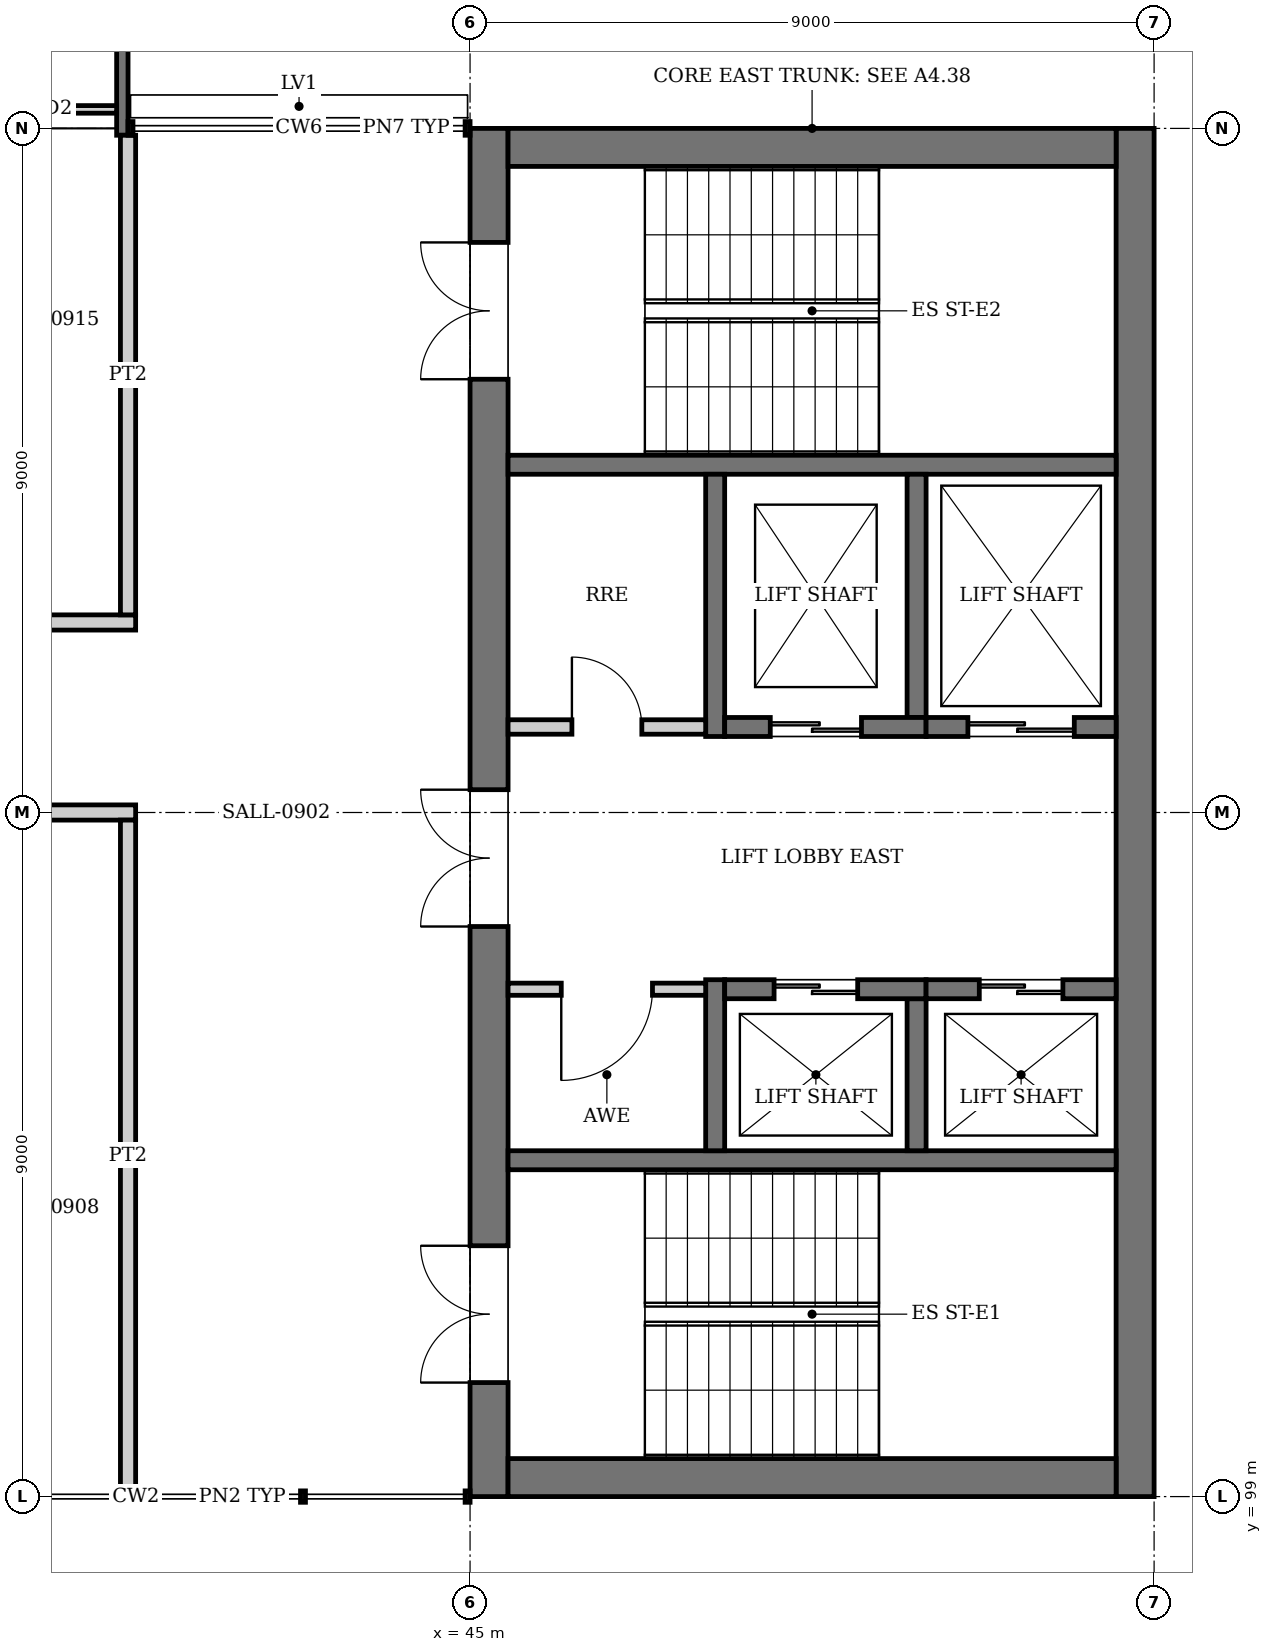
"""IFC4 building model, lengths in metres.
Left out: names, types, materials, properties, quantities, classifications, styles, units other than length and angle.
Written with IfcOpenShell. Run it as: python <this file> out.ifc"""

import sys

from ifc_helpers import new_model, si_unit, direction, frame, frame_2d, origin, place, context, subcontext, project, spatial, rectangle, extrude, element, fill, save


model = new_model("IFC4")
c1 = context("Model", 3, precision=1e-05, world=origin(), true_north=direction((0.0, 1.0)))
c2 = subcontext(c1, "Body", "Model", "MODEL_VIEW")
j1 = project(units=[si_unit("LENGTHUNIT", "METRE"), si_unit("PLANEANGLEUNIT", "RADIAN")], contexts=[c1])
p1 = place(None, origin())
s1 = spatial("IfcSite", under=j1, at=p1, CompositionType="ELEMENT")
p2 = place(p1, origin())
s2 = spatial("IfcBuilding", under=s1, at=p2, CompositionType="ELEMENT")
p3 = place(p2, frame((0.0, 0.0, 39.2)))
s3 = spatial("IfcBuildingStorey", under=s2, at=p3, CompositionType="ELEMENT", Elevation=39.2)
p4 = place(p3, frame((45.25, 99.0, 0.0), z_axis=(0.0, 0.0, 1.0), x_axis=(0.0, 1.0, 0.0)))
e1 = element("IfcWall", 1, at=p4, inside=s3, PredefinedType="SHEAR", context=c2, shape_type="SweptSolid", body=[
    extrude(rectangle(XDim=18.0, YDim=0.5, at=frame_2d((9.0, 0.0))), origin(), (0.0, 0.0, 1.0), 4.0),
])
p5 = place(p4, frame((1.5, 0.0, 0.0)))
e2 = element("IfcOpeningElement", 2, at=p5, cuts=e1, PredefinedType="OPENING", context=c2, shape_type="SweptSolid", body=[
    extrude(rectangle(XDim=1.8, YDim=2.1, at=frame_2d((0.9, 1.05))), frame((0.0, 0.26, 0.0), z_axis=(0.0, -1.0, 0.0), x_axis=(1.0, 0.0, 0.0)), (0.0, 0.0, 1.0), 0.52),
])
p6 = place(p4, frame((14.7, 0.0, 0.0)))
e3 = element("IfcOpeningElement", 3, at=p6, cuts=e1, PredefinedType="OPENING", context=c2, shape_type="SweptSolid", body=[
    extrude(rectangle(XDim=1.8, YDim=2.1, at=frame_2d((0.9, 1.05))), frame((0.0, 0.26, 0.0), z_axis=(0.0, -1.0, 0.0), x_axis=(1.0, 0.0, 0.0)), (0.0, 0.0, 1.0), 0.52),
])
p7 = place(p4, frame((7.5, 0.0, 0.0)))
e4 = element("IfcOpeningElement", 4, at=p7, cuts=e1, PredefinedType="OPENING", context=c2, shape_type="SweptSolid", body=[
    extrude(rectangle(XDim=1.8, YDim=2.1, at=frame_2d((0.9, 1.05))), frame((0.0, 0.26, 0.0), z_axis=(0.0, -1.0, 0.0), x_axis=(1.0, 0.0, 0.0)), (0.0, 0.0, 1.0), 0.52),
])
p8 = place(p3, frame((53.75, 99.0, 0.0), z_axis=(0.0, 0.0, 1.0), x_axis=(0.0, 1.0, 0.0)))
e5 = element("IfcWall", 5, at=p8, inside=s3, PredefinedType="SHEAR", context=c2, shape_type="SweptSolid", body=[
    extrude(rectangle(XDim=18.0, YDim=0.5, at=frame_2d((9.0, 0.0))), origin(), (0.0, 0.0, 1.0), 4.0),
])
for number, where, z_axis, x_axis in (
    (6, (45.5, 99.25, 0.0), (0.0, 0.0, 1.0), (1.0, 0.0, 0.0)),
    (7, (45.5, 116.75, 0.0), (0.0, 0.0, 1.0), (1.0, 0.0, 0.0)),
):
    element("IfcWall", number, at=place(p3, frame(where, z_axis=z_axis, x_axis=x_axis)), inside=s3, PredefinedType="SHEAR", context=c2, shape_type="SweptSolid", body=[
        extrude(rectangle(XDim=8.0, YDim=0.5, at=frame_2d((4.0, 0.0))), origin(), (0.0, 0.0, 1.0), 4.0),
    ])
p9 = place(p3, frame((40.425, 120.45, -0.15), z_axis=(0.0, 0.0, 1.0), x_axis=(0.0, -1.0, 0.0)))
e8 = element("IfcWall", 8, at=p9, inside=s3, PredefinedType="SOLIDWALL", context=c2, shape_type="SweptSolid", body=[
    extrude(rectangle(XDim=3.54, YDim=0.15, at=frame_2d((1.77, 0.0))), origin(), (0.0, 0.0, 1.0), 2.75),
])
p10 = place(p3, frame((36.15, 117.25, 0.0), z_axis=(0.0, 0.0, 1.0), x_axis=(1.0, 0.0, 0.0)))
e9 = element("IfcWall", 9, at=p10, inside=s3, PredefinedType="PARTITIONING", context=c2, shape_type="SweptSolid", body=[
    extrude(rectangle(XDim=4.2, YDim=0.1, at=frame_2d((2.1, 0.0))), origin(), (0.0, 0.0, 1.0), 2.6),
])
p11 = place(p10, frame((1.6, 0.0, 0.0)))
e10 = element("IfcOpeningElement", 10, at=p11, cuts=e9, PredefinedType="OPENING", context=c2, shape_type="SweptSolid", body=[
    extrude(rectangle(XDim=0.9, YDim=2.1, at=frame_2d((0.45, 1.05))), frame((0.0, 0.06, 0.0), z_axis=(0.0, -1.0, 0.0), x_axis=(1.0, 0.0, 0.0)), (0.0, 0.0, 1.0), 0.12),
])
for number, where, z_axis, x_axis in (
    (11, (45.5, 103.425, 0.0), (0.0, 0.0, 1.0), (1.0, 0.0, 0.0)),
    (12, (45.5, 112.575, 0.0), (0.0, 0.0, 1.0), (1.0, 0.0, 0.0)),
):
    element("IfcWall", number, at=place(p3, frame(where, z_axis=z_axis, x_axis=x_axis)), inside=s3, PredefinedType="SOLIDWALL", context=c2, shape_type="SweptSolid", body=[
        extrude(rectangle(XDim=8.0, YDim=0.25, at=frame_2d((4.0, 0.0))), origin(), (0.0, 0.0, 1.0), 3.75),
    ])
p12 = place(p3, frame((48.225, 103.55, 0.0), z_axis=(0.0, 0.0, 1.0), x_axis=(0.0, 1.0, 0.0)))
e13 = element("IfcWall", 13, at=p12, inside=s3, PredefinedType="SOLIDWALL", context=c2, shape_type="SweptSolid", body=[
    extrude(rectangle(XDim=2.25, YDim=0.25, at=frame_2d((1.125, 0.0))), origin(), (0.0, 0.0, 1.0), 4.0),
])
p13 = place(p3, frame((50.875, 103.55, 0.0), z_axis=(0.0, 0.0, 1.0), x_axis=(0.0, 1.0, 0.0)))
e14 = element("IfcWall", 14, at=p13, inside=s3, PredefinedType="SOLIDWALL", context=c2, shape_type="SweptSolid", body=[
    extrude(rectangle(XDim=2.0, YDim=0.25, at=frame_2d((1.0, 0.0))), origin(), (0.0, 0.0, 1.0), 4.0),
])
p14 = place(p3, frame((48.35, 105.675, 0.0), z_axis=(0.0, 0.0, 1.0), x_axis=(1.0, 0.0, 0.0)))
e15 = element("IfcWall", 15, at=p14, inside=s3, PredefinedType="SOLIDWALL", context=c2, shape_type="SweptSolid", body=[
    extrude(rectangle(XDim=2.65, YDim=0.25, at=frame_2d((1.325, 0.0))), origin(), (0.0, 0.0, 1.0), 4.0),
])
p15 = place(p14, frame((0.65, 0.0, 0.0)))
e16 = element("IfcOpeningElement", 16, at=p15, cuts=e15, PredefinedType="OPENING", context=c2, shape_type="SweptSolid", body=[
    extrude(rectangle(XDim=1.1, YDim=2.1, at=frame_2d((0.55, 1.05))), frame((0.0, 0.135, 0.0), z_axis=(0.0, -1.0, 0.0), x_axis=(1.0, 0.0, 0.0)), (0.0, 0.0, 1.0), 0.27),
])
p16 = place(p3, frame((51.0, 105.675, 0.0), z_axis=(0.0, 0.0, 1.0), x_axis=(1.0, 0.0, 0.0)))
e17 = element("IfcWall", 17, at=p16, inside=s3, PredefinedType="SOLIDWALL", context=c2, shape_type="SweptSolid", body=[
    extrude(rectangle(XDim=2.5, YDim=0.25, at=frame_2d((1.25, 0.0))), origin(), (0.0, 0.0, 1.0), 4.0),
])
p17 = place(p16, frame((0.7, 0.0, 0.0)))
e18 = element("IfcOpeningElement", 18, at=p17, cuts=e17, PredefinedType="OPENING", context=c2, shape_type="SweptSolid", body=[
    extrude(rectangle(XDim=1.1, YDim=2.1, at=frame_2d((0.55, 1.05))), frame((0.0, 0.135, 0.0), z_axis=(0.0, -1.0, 0.0), x_axis=(1.0, 0.0, 0.0)), (0.0, 0.0, 1.0), 0.27),
])
p18 = place(p3, frame((48.225, 109.0, 0.0), z_axis=(0.0, 0.0, 1.0), x_axis=(0.0, 1.0, 0.0)))
e19 = element("IfcWall", 19, at=p18, inside=s3, PredefinedType="SOLIDWALL", context=c2, shape_type="SweptSolid", body=[
    extrude(rectangle(XDim=3.45, YDim=0.25, at=frame_2d((1.725, 0.0))), origin(), (0.0, 0.0, 1.0), 4.0),
])
p19 = place(p3, frame((50.875, 109.25, 0.0), z_axis=(0.0, 0.0, 1.0), x_axis=(0.0, 1.0, 0.0)))
e20 = element("IfcWall", 20, at=p19, inside=s3, PredefinedType="SOLIDWALL", context=c2, shape_type="SweptSolid", body=[
    extrude(rectangle(XDim=3.2, YDim=0.25, at=frame_2d((1.6, 0.0))), origin(), (0.0, 0.0, 1.0), 4.0),
])
p20 = place(p3, frame((48.35, 109.125, 0.0), z_axis=(0.0, 0.0, 1.0), x_axis=(1.0, 0.0, 0.0)))
e21 = element("IfcWall", 21, at=p20, inside=s3, PredefinedType="SOLIDWALL", context=c2, shape_type="SweptSolid", body=[
    extrude(rectangle(XDim=2.65, YDim=0.25, at=frame_2d((1.325, 0.0))), origin(), (0.0, 0.0, 1.0), 4.0),
])
p21 = place(p20, frame((0.6, 0.0, 0.0)))
e22 = element("IfcOpeningElement", 22, at=p21, cuts=e21, PredefinedType="OPENING", context=c2, shape_type="SweptSolid", body=[
    extrude(rectangle(XDim=1.2, YDim=2.1, at=frame_2d((0.6, 1.05))), frame((0.0, 0.135, 0.0), z_axis=(0.0, -1.0, 0.0), x_axis=(1.0, 0.0, 0.0)), (0.0, 0.0, 1.0), 0.27),
])
p22 = place(p3, frame((51.0, 109.125, 0.0), z_axis=(0.0, 0.0, 1.0), x_axis=(1.0, 0.0, 0.0)))
e23 = element("IfcWall", 23, at=p22, inside=s3, PredefinedType="SOLIDWALL", context=c2, shape_type="SweptSolid", body=[
    extrude(rectangle(XDim=2.5, YDim=0.25, at=frame_2d((1.25, 0.0))), origin(), (0.0, 0.0, 1.0), 4.0),
])
p23 = place(p22, frame((0.55, 0.0, 0.0)))
e24 = element("IfcOpeningElement", 24, at=p23, cuts=e23, PredefinedType="OPENING", context=c2, shape_type="SweptSolid", body=[
    extrude(rectangle(XDim=1.4, YDim=2.4, at=frame_2d((0.7, 1.2))), frame((0.0, 0.135, 0.0), z_axis=(0.0, -1.0, 0.0), x_axis=(1.0, 0.0, 0.0)), (0.0, 0.0, 1.0), 0.27),
])
p24 = place(p3, frame((45.5, 105.675, 0.0), z_axis=(0.0, 0.0, 1.0), x_axis=(1.0, 0.0, 0.0)))
e25 = element("IfcWall", 25, at=p24, inside=s3, PredefinedType="PARTITIONING", context=c2, shape_type="SweptSolid", body=[
    extrude(rectangle(XDim=2.6, YDim=0.16, at=frame_2d((1.3, 0.0))), origin(), (0.0, 0.0, 1.0), 3.75),
])
p25 = place(p24, frame((0.7, 0.0, 0.0)))
e26 = element("IfcOpeningElement", 26, at=p25, cuts=e25, PredefinedType="OPENING", context=c2, shape_type="SweptSolid", body=[
    extrude(rectangle(XDim=1.2, YDim=2.1, at=frame_2d((0.6, 1.05))), frame((0.0, 0.09, 0.0), z_axis=(0.0, -1.0, 0.0), x_axis=(1.0, 0.0, 0.0)), (0.0, 0.0, 1.0), 0.18),
])
p26 = place(p3, frame((45.5, 109.125, 0.0), z_axis=(0.0, 0.0, 1.0), x_axis=(1.0, 0.0, 0.0)))
e27 = element("IfcWall", 27, at=p26, inside=s3, PredefinedType="PARTITIONING", context=c2, shape_type="SweptSolid", body=[
    extrude(rectangle(XDim=2.6, YDim=0.19, at=frame_2d((1.3, 0.0))), origin(), (0.0, 0.0, 1.0), 3.75),
])
p27 = place(p26, frame((0.84, 0.0, 0.0)))
e28 = element("IfcOpeningElement", 28, at=p27, cuts=e27, PredefinedType="OPENING", context=c2, shape_type="SweptSolid", body=[
    extrude(rectangle(XDim=0.92, YDim=2.1, at=frame_2d((0.46, 1.05))), frame((0.0, 0.105, 0.0), z_axis=(0.0, -1.0, 0.0), x_axis=(1.0, 0.0, 0.0)), (0.0, 0.0, 1.0), 0.21),
])
p28 = place(p3, frame((18.08, 108.0, 0.0), z_axis=(0.0, 0.0, 1.0), x_axis=(1.0, 0.0, 0.0)))
e29 = element("IfcWall", 29, at=p28, inside=s3, PredefinedType="PARTITIONING", context=c2, shape_type="SweptSolid", body=[
    extrude(rectangle(XDim=22.52, YDim=0.2, at=frame_2d((11.26, 0.0))), origin(), (0.0, 0.0, 1.0), 3.05),
])
p29 = place(p28, frame((5.77, 0.0, 0.0)))
e30 = element("IfcOpeningElement", 30, at=p29, cuts=e29, PredefinedType="OPENING", context=c2, shape_type="SweptSolid", body=[
    extrude(rectangle(XDim=1.8, YDim=2.1, at=frame_2d((0.9, 1.05))), frame((0.0, 0.11, 0.0), z_axis=(0.0, -1.0, 0.0), x_axis=(1.0, 0.0, 0.0)), (0.0, 0.0, 1.0), 0.22),
])
p30 = place(p28, frame((15.17, 0.0, 0.0)))
e31 = element("IfcOpeningElement", 31, at=p30, cuts=e29, PredefinedType="OPENING", context=c2, shape_type="SweptSolid", body=[
    extrude(rectangle(XDim=1.0, YDim=2.1, at=frame_2d((0.5, 1.05))), frame((0.0, 0.11, 0.0), z_axis=(0.0, -1.0, 0.0), x_axis=(1.0, 0.0, 0.0)), (0.0, 0.0, 1.0), 0.22),
])
p31 = place(p28, frame((19.67, 0.0, 0.0)))
e32 = element("IfcOpeningElement", 32, at=p31, cuts=e29, PredefinedType="OPENING", context=c2, shape_type="SweptSolid", body=[
    extrude(rectangle(XDim=1.0, YDim=2.1, at=frame_2d((0.5, 1.05))), frame((0.0, 0.11, 0.0), z_axis=(0.0, -1.0, 0.0), x_axis=(1.0, 0.0, 0.0)), (0.0, 0.0, 1.0), 0.22),
])
p32 = place(p3, frame((13.4, 110.5, 0.0), z_axis=(0.0, 0.0, 1.0), x_axis=(1.0, 0.0, 0.0)))
e33 = element("IfcWall", 33, at=p32, inside=s3, PredefinedType="PARTITIONING", context=c2, shape_type="SweptSolid", body=[
    extrude(rectangle(XDim=27.2, YDim=0.2, at=frame_2d((13.6, 0.0))), origin(), (0.0, 0.0, 1.0), 3.05),
])
p33 = place(p32, frame((6.35, 0.0, 0.0)))
e34 = element("IfcOpeningElement", 34, at=p33, cuts=e33, PredefinedType="OPENING", context=c2, shape_type="SweptSolid", body=[
    extrude(rectangle(XDim=1.0, YDim=2.1, at=frame_2d((0.5, 1.05))), frame((0.0, 0.11, 0.0), z_axis=(0.0, -1.0, 0.0), x_axis=(1.0, 0.0, 0.0)), (0.0, 0.0, 1.0), 0.22),
])
p34 = place(p32, frame((10.85, 0.0, 0.0)))
e35 = element("IfcOpeningElement", 35, at=p34, cuts=e33, PredefinedType="OPENING", context=c2, shape_type="SweptSolid", body=[
    extrude(rectangle(XDim=1.0, YDim=2.1, at=frame_2d((0.5, 1.05))), frame((0.0, 0.11, 0.0), z_axis=(0.0, -1.0, 0.0), x_axis=(1.0, 0.0, 0.0)), (0.0, 0.0, 1.0), 0.22),
])
p35 = place(p32, frame((15.35, 0.0, 0.0)))
e36 = element("IfcOpeningElement", 36, at=p35, cuts=e33, PredefinedType="OPENING", context=c2, shape_type="SweptSolid", body=[
    extrude(rectangle(XDim=1.0, YDim=2.1, at=frame_2d((0.5, 1.05))), frame((0.0, 0.11, 0.0), z_axis=(0.0, -1.0, 0.0), x_axis=(1.0, 0.0, 0.0)), (0.0, 0.0, 1.0), 0.22),
])
p36 = place(p32, frame((19.85, 0.0, 0.0)))
e37 = element("IfcOpeningElement", 37, at=p36, cuts=e33, PredefinedType="OPENING", context=c2, shape_type="SweptSolid", body=[
    extrude(rectangle(XDim=1.0, YDim=2.1, at=frame_2d((0.5, 1.05))), frame((0.0, 0.11, 0.0), z_axis=(0.0, -1.0, 0.0), x_axis=(1.0, 0.0, 0.0)), (0.0, 0.0, 1.0), 0.22),
])
p37 = place(p32, frame((24.35, 0.0, 0.0)))
e38 = element("IfcOpeningElement", 38, at=p37, cuts=e33, PredefinedType="OPENING", context=c2, shape_type="SweptSolid", body=[
    extrude(rectangle(XDim=1.0, YDim=2.1, at=frame_2d((0.5, 1.05))), frame((0.0, 0.11, 0.0), z_axis=(0.0, -1.0, 0.0), x_axis=(1.0, 0.0, 0.0)), (0.0, 0.0, 1.0), 0.22),
])
p38 = place(p3, frame((40.5, 99.075, 0.0), z_axis=(0.0, 0.0, 1.0), x_axis=(0.0, 1.0, 0.0)))
e39 = element("IfcWall", 39, at=p38, inside=s3, PredefinedType="PARTITIONING", context=c2, shape_type="SweptSolid", body=[
    extrude(rectangle(XDim=8.825, YDim=0.2, at=frame_2d((4.413, 0.0))), origin(), (0.0, 0.0, 1.0), 3.05),
])
p39 = place(p3, frame((40.5, 110.6, 0.0), z_axis=(0.0, 0.0, 1.0), x_axis=(0.0, 1.0, 0.0)))
e40 = element("IfcWall", 40, at=p39, inside=s3, PredefinedType="PARTITIONING", context=c2, shape_type="SweptSolid", body=[
    extrude(rectangle(XDim=6.31, YDim=0.2, at=frame_2d((3.155, 0.0))), origin(), (0.0, 0.0, 1.0), 3.05),
])
p40 = place(p15, origin())
e41 = element("IfcDoor", 41, at=p40, inside=s3, OperationType="DOUBLE_DOOR_SLIDING", PredefinedType="DOOR", context=c2, shape_type="SweptSolid", body=[
    extrude(rectangle(XDim=1.1, YDim=2.1, at=frame_2d((0.55, 1.05))), frame((0.0, 0.025, 0.0), z_axis=(0.0, -1.0, 0.0), x_axis=(1.0, 0.0, 0.0)), (0.0, 0.0, 1.0), 0.05),
])
fill(e16, e41)
p41 = place(p17, origin())
e42 = element("IfcDoor", 42, at=p41, inside=s3, OperationType="DOUBLE_DOOR_SLIDING", PredefinedType="DOOR", context=c2, shape_type="SweptSolid", body=[
    extrude(rectangle(XDim=1.1, YDim=2.1, at=frame_2d((0.55, 1.05))), frame((0.0, 0.025, 0.0), z_axis=(0.0, -1.0, 0.0), x_axis=(1.0, 0.0, 0.0)), (0.0, 0.0, 1.0), 0.05),
])
fill(e18, e42)
p42 = place(p21, origin())
e43 = element("IfcDoor", 43, at=p42, inside=s3, OperationType="DOUBLE_DOOR_SLIDING", PredefinedType="DOOR", context=c2, shape_type="SweptSolid", body=[
    extrude(rectangle(XDim=1.2, YDim=2.1, at=frame_2d((0.6, 1.05))), frame((0.0, 0.025, 0.0), z_axis=(0.0, -1.0, 0.0), x_axis=(1.0, 0.0, 0.0)), (0.0, 0.0, 1.0), 0.05),
])
fill(e22, e43)
p43 = place(p23, origin())
e44 = element("IfcDoor", 44, at=p43, inside=s3, OperationType="DOUBLE_DOOR_SLIDING", PredefinedType="DOOR", context=c2, shape_type="SweptSolid", body=[
    extrude(rectangle(XDim=1.4, YDim=2.4, at=frame_2d((0.7, 1.2))), frame((0.0, 0.025, 0.0), z_axis=(0.0, -1.0, 0.0), x_axis=(1.0, 0.0, 0.0)), (0.0, 0.0, 1.0), 0.05),
])
fill(e24, e44)
p44 = place(p5, origin())
e45 = element("IfcDoor", 45, at=p44, inside=s3, OperationType="DOUBLE_DOOR_SINGLE_SWING", PredefinedType="DOOR", context=c2, shape_type="SweptSolid", body=[
    extrude(rectangle(XDim=1.8, YDim=2.1, at=frame_2d((0.9, 1.05))), frame((0.0, 0.025, 0.0), z_axis=(0.0, -1.0, 0.0), x_axis=(1.0, 0.0, 0.0)), (0.0, 0.0, 1.0), 0.05),
])
fill(e2, e45)
p45 = place(p6, origin())
e46 = element("IfcDoor", 46, at=p45, inside=s3, OperationType="DOUBLE_DOOR_SINGLE_SWING", PredefinedType="DOOR", context=c2, shape_type="SweptSolid", body=[
    extrude(rectangle(XDim=1.8, YDim=2.1, at=frame_2d((0.9, 1.05))), frame((0.0, 0.025, 0.0), z_axis=(0.0, -1.0, 0.0), x_axis=(1.0, 0.0, 0.0)), (0.0, 0.0, 1.0), 0.05),
])
fill(e3, e46)
p46 = place(p7, origin())
e47 = element("IfcDoor", 47, at=p46, inside=s3, OperationType="DOUBLE_DOOR_SINGLE_SWING", PredefinedType="DOOR", context=c2, shape_type="SweptSolid", body=[
    extrude(rectangle(XDim=1.8, YDim=2.1, at=frame_2d((0.9, 1.05))), frame((0.0, 0.025, 0.0), z_axis=(0.0, -1.0, 0.0), x_axis=(1.0, 0.0, 0.0)), (0.0, 0.0, 1.0), 0.05),
])
fill(e4, e47)
p47 = place(p25, frame((1.2, 0.0, 0.0), z_axis=(0.0, 0.0, 1.0), x_axis=(-1.0, 0.0, 0.0)))
e48 = element("IfcDoor", 48, at=p47, inside=s3, OperationType="SINGLE_SWING_RIGHT", PredefinedType="DOOR", context=c2, shape_type="SweptSolid", body=[
    extrude(rectangle(XDim=1.2, YDim=2.1, at=frame_2d((0.6, 1.05))), frame((0.0, 0.025, 0.0), z_axis=(0.0, -1.0, 0.0), x_axis=(1.0, 0.0, 0.0)), (0.0, 0.0, 1.0), 0.05),
])
fill(e26, e48)
p48 = place(p27, origin())
e49 = element("IfcDoor", 49, at=p48, inside=s3, OperationType="SINGLE_SWING_LEFT", PredefinedType="DOOR", context=c2, shape_type="SweptSolid", body=[
    extrude(rectangle(XDim=0.92, YDim=2.1, at=frame_2d((0.46, 1.05))), frame((0.0, 0.025, 0.0), z_axis=(0.0, -1.0, 0.0), x_axis=(1.0, 0.0, 0.0)), (0.0, 0.0, 1.0), 0.05),
])
fill(e28, e49)
save(model, sys.argv[1])
